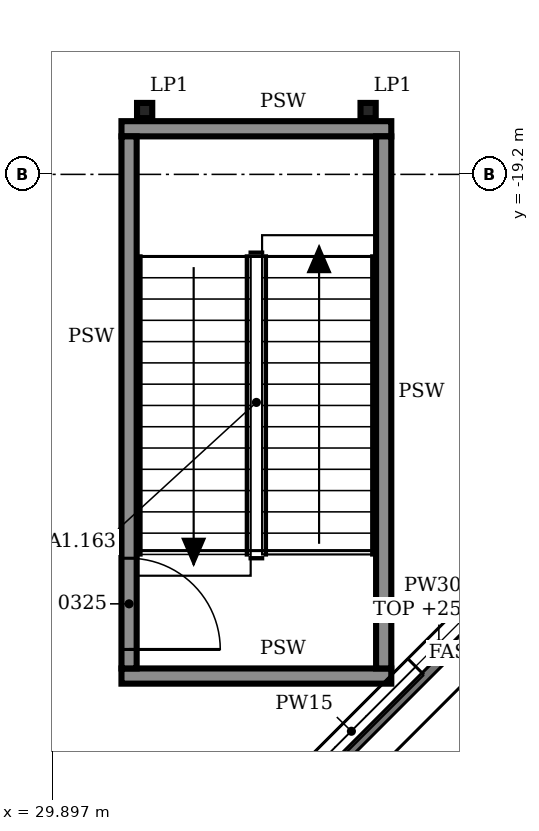
"""IFC4 building model, lengths in metres.
Left out: names, types, materials, properties, quantities, classifications, styles, units other than length and angle.
Written with IfcOpenShell. Run it as: python <this file> out.ifc"""

import sys

from ifc_helpers import new_model, si_unit, direction, frame, frame_2d, origin, origin_2d, place, context, subcontext, project, spatial, rectangle, i_section, extrude, element, fill, save


model = new_model("IFC4")
c1 = context("Model", 3, precision=1e-05, world=origin(), true_north=direction((0.0, 1.0)))
c2 = subcontext(c1, "Body", "Model", "MODEL_VIEW")
j1 = project(units=[si_unit("LENGTHUNIT", "METRE"), si_unit("PLANEANGLEUNIT", "RADIAN")], contexts=[c1])
p1 = place(None, origin())
s1 = spatial("IfcSite", under=j1, at=p1, CompositionType="ELEMENT")
p2 = place(p1, origin())
s2 = spatial("IfcBuilding", under=s1, at=p2, CompositionType="ELEMENT")
p3 = place(p2, frame((0.0, 0.0, 21.0)))
s3 = spatial("IfcBuildingStorey", under=s2, at=p3, CompositionType="ELEMENT", Elevation=21.0)
for number, where, z_axis, x_axis in (
    (1, (31.105, -18.36, 0.0), (0.0, 0.0, 1.0), (1.0, 0.0, 0.0)),
    (2, (34.045, -18.36, 0.0), (0.0, 0.0, 1.0), (1.0, 0.0, 0.0)),
):
    element("IfcColumn", number, at=place(p3, frame(where, z_axis=z_axis, x_axis=x_axis)), inside=s3, PredefinedType="COLUMN", context=c2, shape_type="SweptSolid", body=[
        extrude(i_section(OverallWidth=0.2, OverallDepth=0.2, WebThickness=0.009, FlangeThickness=0.015, FilletRadius=0.018, at=origin_2d()), origin(), (0.0, 0.0, 1.0), 4.8),
    ])
p4 = place(p3, frame((32.675, -27.677, 0.0), z_axis=(0.0, 0.0, 1.0), x_axis=(0.707088024292, 0.707125537583, 0.0)))
e3 = element("IfcWall", 3, at=p4, inside=s3, PredefinedType="SOLIDWALL", context=c2, shape_type="SweptSolid", body=[
    extrude(rectangle(XDim=6.508, YDim=0.3, at=frame_2d((3.254, 0.0))), origin(), (0.0, 0.0, 1.0), 4.0),
])
p5 = place(p4, frame((0.427, 0.0, 0.9)))
e4 = element("IfcOpeningElement", 4, at=p5, cuts=e3, PredefinedType="OPENING", context=c2, shape_type="SweptSolid", body=[
    extrude(rectangle(XDim=2.4, YDim=1.5, at=frame_2d((1.2, 0.75))), frame((0.0, 0.16, 0.0), z_axis=(0.0, -1.0, 0.0), x_axis=(1.0, 0.0, 0.0)), (0.0, 0.0, 1.0), 0.32),
])
p6 = place(p4, frame((3.681, 0.0, 0.9)))
e5 = element("IfcOpeningElement", 5, at=p6, cuts=e3, PredefinedType="OPENING", context=c2, shape_type="SweptSolid", body=[
    extrude(rectangle(XDim=2.4, YDim=1.5, at=frame_2d((1.2, 0.75))), frame((0.0, 0.16, 0.0), z_axis=(0.0, -1.0, 0.0), x_axis=(1.0, 0.0, 0.0)), (0.0, 0.0, 1.0), 0.32),
])
p7 = place(p3, frame((30.8, -25.8, 0.0), z_axis=(0.0, 0.0, 1.0), x_axis=(1.0, 0.0, 0.0)))
e6 = element("IfcWall", 6, at=p7, inside=s3, PredefinedType="SOLIDWALL", context=c2, shape_type="SweptSolid", body=[
    extrude(rectangle(XDim=3.55, YDim=0.2, at=frame_2d((1.775, 0.0))), origin(), (0.0, 0.0, 1.0), 4.6),
])
p8 = place(p3, frame((30.9, -25.7, 0.0), z_axis=(0.0, 0.0, 1.0), x_axis=(0.0, 1.0, 0.0)))
e7 = element("IfcWall", 7, at=p8, inside=s3, PredefinedType="SOLIDWALL", context=c2, shape_type="SweptSolid", body=[
    extrude(rectangle(XDim=7.0, YDim=0.2, at=frame_2d((3.5, 0.0))), origin(), (0.0, 0.0, 1.0), 4.6),
])
p9 = place(p8, frame((0.25, 0.0, 0.0)))
e8 = element("IfcOpeningElement", 8, at=p9, cuts=e7, PredefinedType="OPENING", context=c2, shape_type="SweptSolid", body=[
    extrude(rectangle(XDim=1.2, YDim=2.1, at=frame_2d((0.6, 1.05))), frame((0.0, 0.11, 0.0), z_axis=(0.0, -1.0, 0.0), x_axis=(1.0, 0.0, 0.0)), (0.0, 0.0, 1.0), 0.22),
])
p10 = place(p3, frame((34.25, -25.7, 0.0), z_axis=(0.0, 0.0, 1.0), x_axis=(0.0, 1.0, 0.0)))
e9 = element("IfcWall", 9, at=p10, inside=s3, PredefinedType="SOLIDWALL", context=c2, shape_type="SweptSolid", body=[
    extrude(rectangle(XDim=7.0, YDim=0.2, at=frame_2d((3.5, 0.0))), origin(), (0.0, 0.0, 1.0), 4.6),
])
p11 = place(p3, frame((30.8, -18.6, 0.0), z_axis=(0.0, 0.0, 1.0), x_axis=(1.0, 0.0, 0.0)))
e10 = element("IfcWall", 10, at=p11, inside=s3, PredefinedType="SOLIDWALL", context=c2, shape_type="SweptSolid", body=[
    extrude(rectangle(XDim=3.55, YDim=0.2, at=frame_2d((1.775, 0.0))), origin(), (0.0, 0.0, 1.0), 4.6),
])
p12 = place(p5, origin())
e11 = element("IfcWindow", 11, at=p12, inside=s3, PartitioningType="SINGLE_PANEL", PredefinedType="WINDOW", context=c2, shape_type="SweptSolid", body=[
    extrude(rectangle(XDim=2.4, YDim=1.5, at=frame_2d((1.2, 0.75))), frame((0.0, 0.03, 0.0), z_axis=(0.0, -1.0, 0.0), x_axis=(1.0, 0.0, 0.0)), (0.0, 0.0, 1.0), 0.06),
])
fill(e4, e11)
p13 = place(p9, frame((1.2, 0.0, 0.0), z_axis=(0.0, 0.0, 1.0), x_axis=(-1.0, 0.0, 0.0)))
e12 = element("IfcDoor", 12, at=p13, inside=s3, OperationType="SINGLE_SWING_RIGHT", PredefinedType="DOOR", context=c2, shape_type="SweptSolid", body=[
    extrude(rectangle(XDim=1.2, YDim=2.1, at=frame_2d((0.6, 1.05))), frame((0.0, 0.025, 0.0), z_axis=(0.0, -1.0, 0.0), x_axis=(1.0, 0.0, 0.0)), (0.0, 0.0, 1.0), 0.05),
])
fill(e8, e12)
save(model, sys.argv[1])
